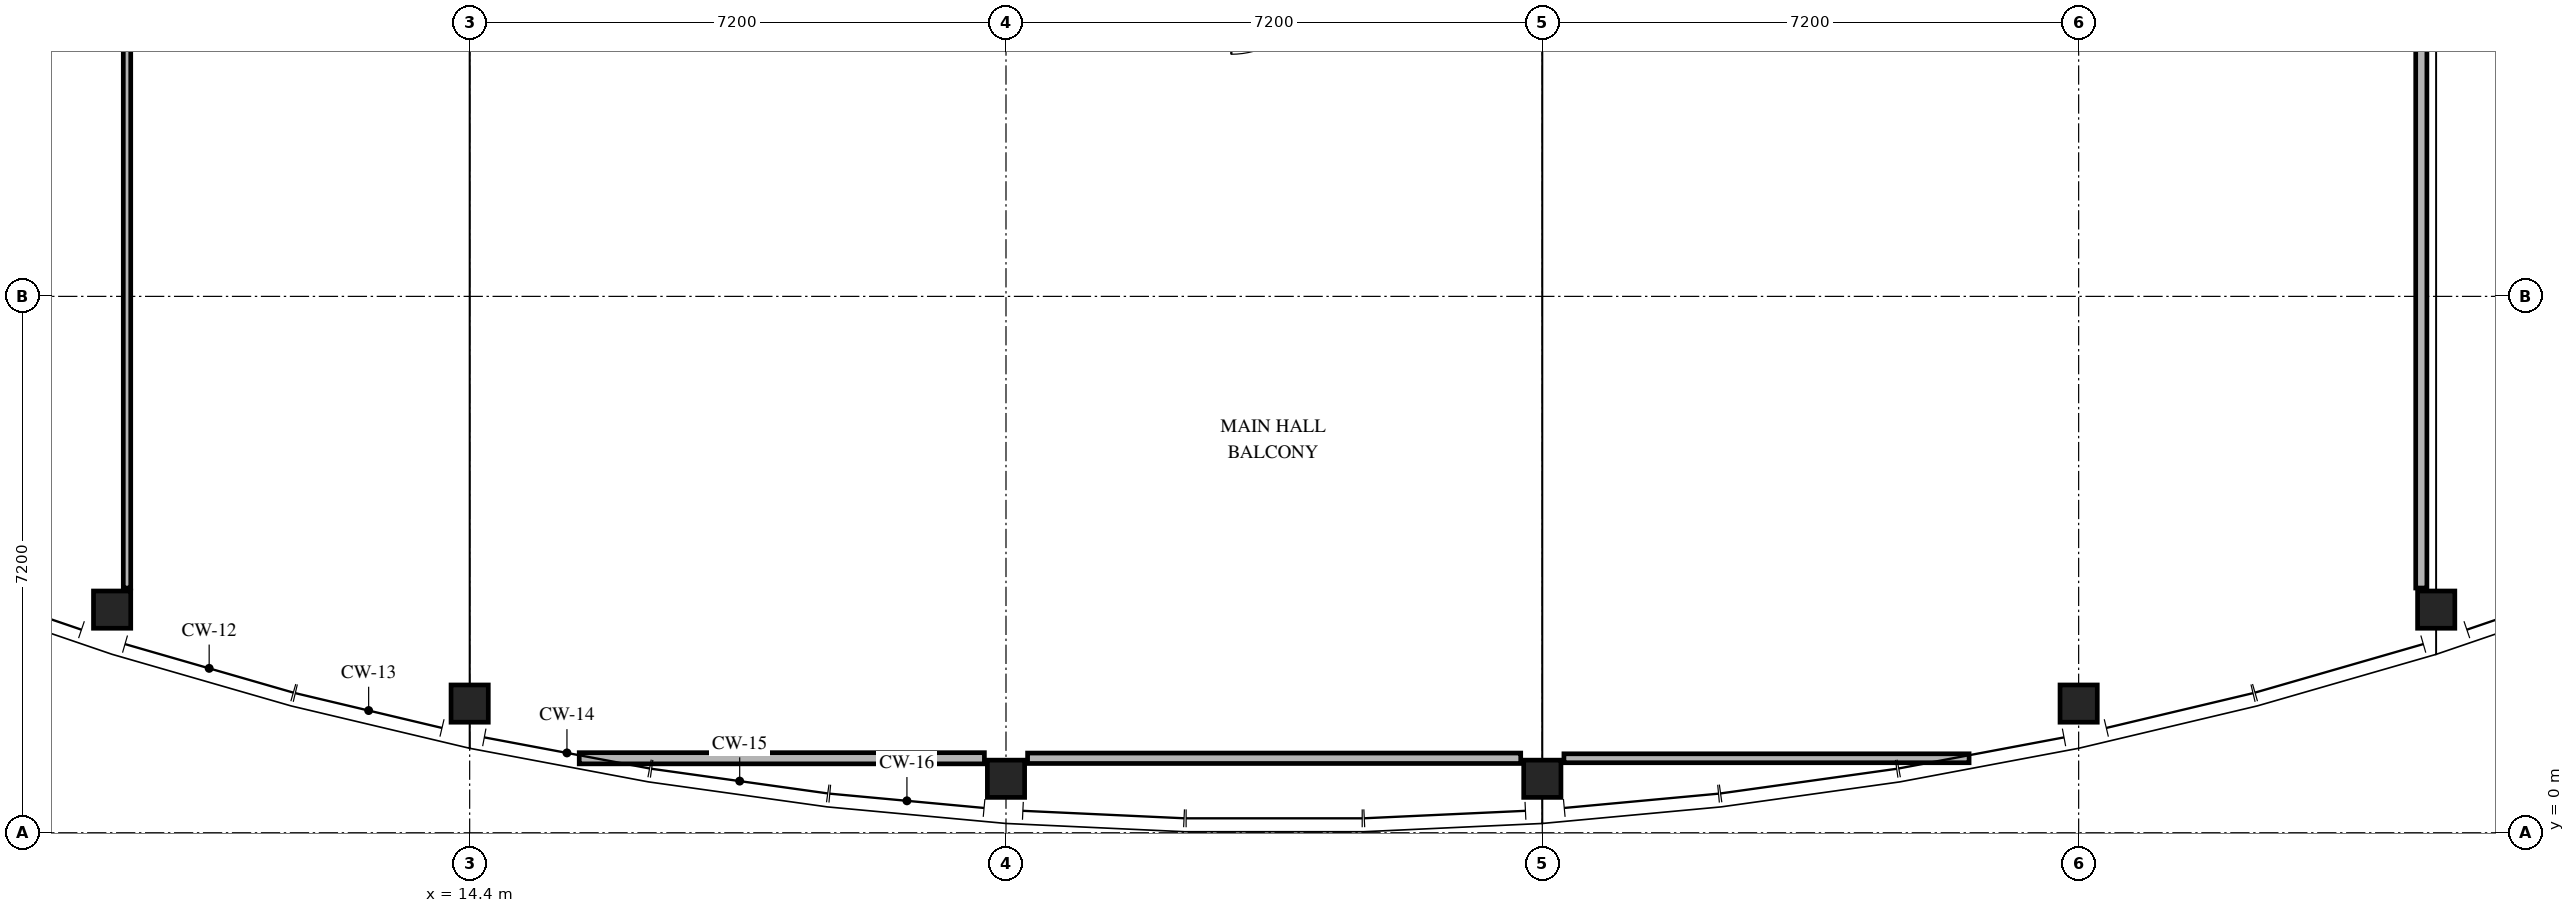
"""IFC4 building model, lengths in metres.
Left out: names, types, materials, properties, quantities, classifications, styles, units other than length and angle.
Written with IfcOpenShell. Run it as: python <this file> out.ifc"""

import sys

from ifc_helpers import new_model, si_unit, direction, frame, frame_2d, origin, origin_2d, place, context, subcontext, project, spatial, rectangle, circle, extrude, element, save


model = new_model("IFC4")
c1 = context("Model", 3, precision=1e-05, world=origin(), true_north=direction((0.0, 1.0)))
c2 = subcontext(c1, "Body", "Model", "MODEL_VIEW")
j1 = project(units=[si_unit("LENGTHUNIT", "METRE"), si_unit("PLANEANGLEUNIT", "RADIAN")], contexts=[c1])
p1 = place(None, origin())
s1 = spatial("IfcSite", under=j1, at=p1, CompositionType="ELEMENT")
p2 = place(p1, origin())
s2 = spatial("IfcBuilding", under=s1, at=p2, CompositionType="ELEMENT")
p3 = place(p2, frame((0.0, 0.0, 8.7)))
s3 = spatial("IfcBuildingStorey", under=s2, at=p3, CompositionType="ELEMENT", Elevation=8.7)
for number, where, z_axis, x_axis in (
    (1, (9.6, 2.995, 0.0), (0.0, 0.0, 1.0), (1.0, 0.0, 0.0)),
    (2, (14.4, 1.734, 0.0), (0.0, 0.0, 1.0), (1.0, 0.0, 0.0)),
    (3, (21.6, 0.725, 0.0), (0.0, 0.0, 1.0), (1.0, 0.0, 0.0)),
    (4, (28.8, 0.725, 0.0), (0.0, 0.0, 1.0), (1.0, 0.0, 0.0)),
    (5, (36.0, 1.734, 0.0), (0.0, 0.0, 1.0), (1.0, 0.0, 0.0)),
    (6, (40.8, 2.995, 0.0), (0.0, 0.0, 1.0), (1.0, 0.0, 0.0)),
):
    element("IfcColumn", number, at=place(p3, frame(where, z_axis=z_axis, x_axis=x_axis)), inside=s3, PredefinedType="COLUMN", context=c2, shape_type="SweptSolid", body=[
        extrude(circle(Radius=0.25, at=origin_2d()), origin(), (0.0, 0.0, 1.0), 4.2),
    ])
p4 = place(p3, frame((15.871, 1.0, 0.0), z_axis=(0.0, 0.0, 1.0), x_axis=(1.0, 0.0, 0.0)))
e7 = element("IfcWall", 7, at=p4, inside=s3, PredefinedType="PARTITIONING", context=c2, shape_type="SweptSolid", body=[
    extrude(rectangle(XDim=5.439, YDim=0.15, at=frame_2d((2.72, 0.0))), origin(), (0.0, 0.0, 1.0), 3.36),
])
p5 = place(p3, frame((21.89, 1.0, 0.0), z_axis=(0.0, 0.0, 1.0), x_axis=(1.0, 0.0, 0.0)))
e8 = element("IfcWall", 8, at=p5, inside=s3, PredefinedType="PARTITIONING", context=c2, shape_type="SweptSolid", body=[
    extrude(rectangle(XDim=6.62, YDim=0.14, at=frame_2d((3.31, 0.0))), origin(), (0.0, 0.0, 1.0), 3.96),
])
p6 = place(p3, frame((29.09, 1.0, 0.0), z_axis=(0.0, 0.0, 1.0), x_axis=(1.0, 0.0, 0.0)))
e9 = element("IfcWall", 9, at=p6, inside=s3, PredefinedType="PARTITIONING", context=c2, shape_type="SweptSolid", body=[
    extrude(rectangle(XDim=5.439, YDim=0.12, at=frame_2d((2.72, 0.0))), origin(), (0.0, 0.0, 1.0), 3.36),
])
p7 = place(p3, frame((9.8, 11.6, 0.0), z_axis=(0.0, 0.0, 1.0), x_axis=(0.0, -1.0, 0.0)))
e10 = element("IfcWall", 10, at=p7, inside=s3, PredefinedType="PARTITIONING", context=c2, shape_type="SweptSolid", body=[
    extrude(rectangle(XDim=8.315, YDim=0.1, at=frame_2d((4.157, 0.0))), origin(), (0.0, 0.0, 1.0), 3.36),
])
p8 = place(p3, frame((40.6, 3.285, 0.0), z_axis=(0.0, 0.0, 1.0), x_axis=(0.0, 1.0, 0.0)))
e11 = element("IfcWall", 11, at=p8, inside=s3, PredefinedType="PARTITIONING", context=c2, shape_type="SweptSolid", body=[
    extrude(rectangle(XDim=8.315, YDim=0.15, at=frame_2d((4.157, 0.0))), origin(), (0.0, 0.0, 1.0), 3.36),
])
save(model, sys.argv[1])
